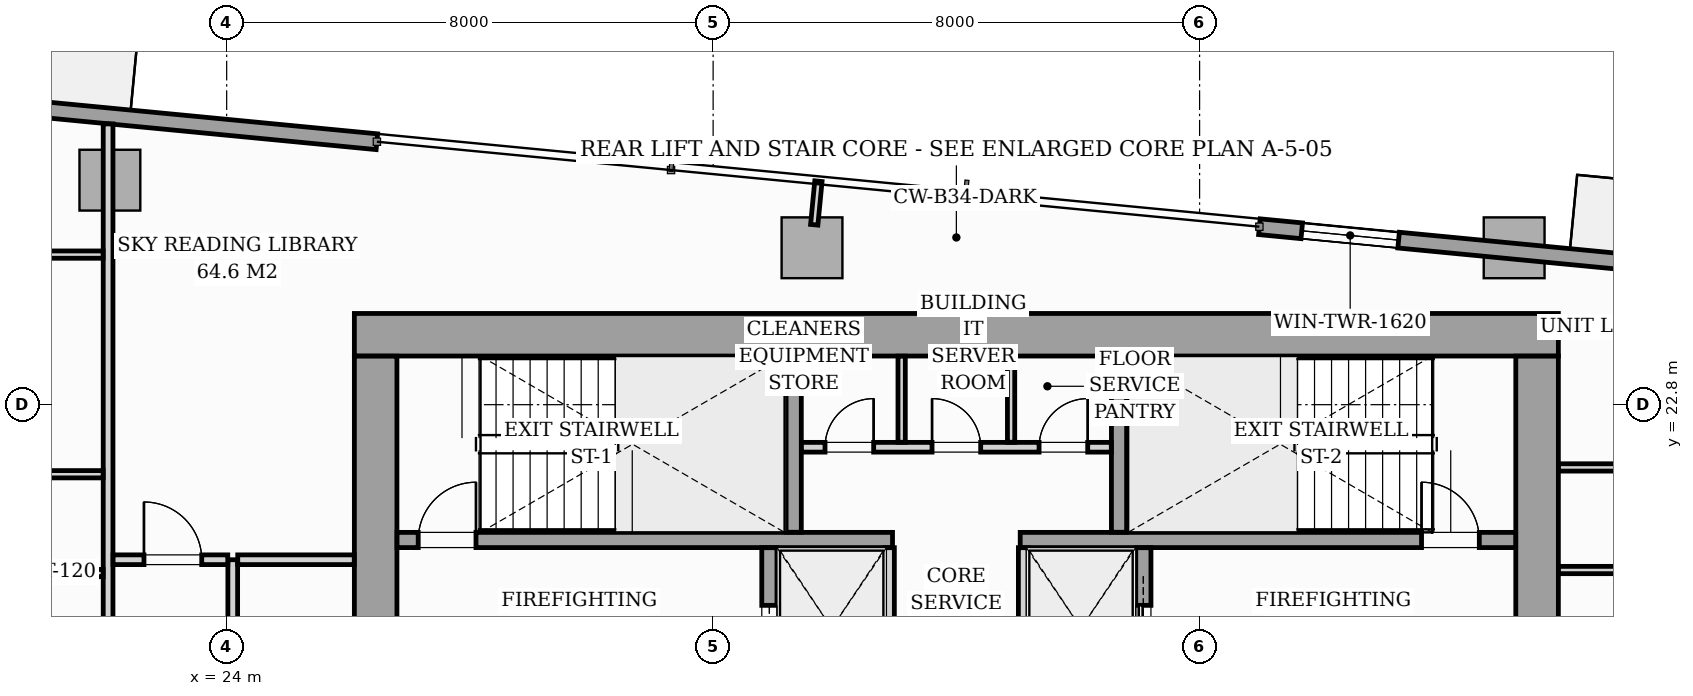
"""IFC4 building model, lengths in metres.
Left out: names, types, materials, properties, quantities, classifications, styles, units other than length and angle.
Written with IfcOpenShell. Run it as: python <this file> out.ifc"""

import sys

from ifc_helpers import new_model, si_unit, direction, frame, frame_2d, origin, origin_2d, place, context, subcontext, project, spatial, rectangle, i_section, extrude, source, transform, mapped, element, fill, save


model = new_model("IFC4")
c1 = context("Model", 3, precision=1e-05, world=origin(), true_north=direction((0.0, 1.0)))
c2 = subcontext(c1, "Body", "Model", "MODEL_VIEW")
j1 = project(units=[si_unit("LENGTHUNIT", "METRE"), si_unit("PLANEANGLEUNIT", "RADIAN")], contexts=[c1])
p1 = place(None, origin())
s1 = spatial("IfcSite", under=j1, at=p1, CompositionType="ELEMENT")
p2 = place(p1, origin())
s2 = spatial("IfcBuilding", under=s1, at=p2, CompositionType="ELEMENT")
p3 = place(p2, frame((0.0, 0.0, 124.6)))
s3 = spatial("IfcBuildingStorey", under=s2, at=p3, CompositionType="ELEMENT", Elevation=124.6)
m1 = source(origin(), c2, "Body", "SweptSolid", [
    extrude(i_section(OverallWidth=0.421, OverallDepth=0.465, WebThickness=0.045, FlangeThickness=0.073, FilletRadius=0.018, at=origin_2d()), origin(), (0.0, 0.0, 1.0), 3.196),
])
for number, where, z_axis, x_axis in (
    (1, (26.4, 24.0, 0.002), (0.0, 0.0, 1.0), (1.0, 0.0, 0.0)),
    (2, (33.12, 24.0, 0.002), (0.0, 0.0, 1.0), (1.0, 0.0, 0.0)),
    (3, (38.88, 24.0, 0.002), (0.0, 0.0, 1.0), (1.0, 0.0, 0.0)),
    (4, (45.6, 24.0, 0.002), (0.0, 0.0, 1.0), (1.0, 0.0, 0.0)),
):
    element("IfcColumn", number, at=place(p3, frame(where, z_axis=z_axis, x_axis=x_axis)), inside=s3, PredefinedType="PILASTER", context=c2, shape_type="MappedRepresentation", body=[
        mapped(m1, transform((0.0, 0.0, 0.0), scale=1.0)),
    ])
m2 = source(origin(), c2, "Body", "SweptSolid", [
    extrude(rectangle(XDim=1.0, YDim=1.0, at=origin_2d()), origin(), (0.0, 0.0, 1.0), 3.194),
])
for number, where, z_axis, x_axis in (
    (5, (22.08, 26.492, 0.004), (0.0, 0.0, 1.0), (0.995, -0.096, 0.0)),
    (6, (33.626, 25.38, 0.004), (0.0, 0.0, 1.0), (0.995, -0.096, 0.0)),
    (7, (45.173, 25.38, 0.004), (0.0, 0.0, 1.0), (0.995, -0.096, 0.0)),
):
    element("IfcColumn", number, at=place(p3, frame(where, z_axis=z_axis, x_axis=x_axis)), inside=s3, PredefinedType="COLUMN", context=c2, shape_type="MappedRepresentation", body=[
        mapped(m2, transform((0.0, 0.0, 0.0), scale=1.0)),
    ])
p4 = place(p3, frame((9.539, 28.754, 0.0), z_axis=(0.0, 0.0, 1.0), x_axis=(0.995397345886, -0.09583383433, 0.0)))
e8 = element("IfcWall", 8, at=p4, inside=s3, PredefinedType="STANDARD", context=c2, shape_type="SweptSolid", body=[
    extrude(rectangle(XDim=17.01, YDim=0.26, at=frame_2d((8.505, 0.0))), origin(), (0.0, 0.0, 1.0), 2.94),
])
p5 = place(p4, frame((6.711, 0.0, 0.0)))
e9 = element("IfcOpeningElement", 9, at=p5, cuts=e8, PredefinedType="OPENING", context=c2, shape_type="SweptSolid", body=[
    extrude(rectangle(XDim=1.8, YDim=2.06, at=frame_2d((0.9, 1.03))), frame((0.0, 0.14, 0.0), z_axis=(0.0, -1.0, 0.0), x_axis=(1.0, 0.0, 0.0)), (0.0, 0.0, 1.0), 0.28),
])
p6 = place(p4, frame((2.5, 0.0, 0.65)))
e10 = element("IfcOpeningElement", 10, at=p6, cuts=e8, PredefinedType="OPENING", context=c2, shape_type="SweptSolid", body=[
    extrude(rectangle(XDim=1.6, YDim=1.5, at=frame_2d((0.8, 0.75))), frame((0.0, 0.14, 0.0), z_axis=(0.0, -1.0, 0.0), x_axis=(1.0, 0.0, 0.0)), (0.0, 0.0, 1.0), 0.28),
])
p7 = place(p3, frame((40.983, 25.727, 0.0), z_axis=(0.0, 0.0, 1.0), x_axis=(0.995395844771, -0.095849424686, 0.0)))
e11 = element("IfcWall", 11, at=p7, inside=s3, PredefinedType="STANDARD", context=c2, shape_type="SweptSolid", body=[
    extrude(rectangle(XDim=17.01, YDim=0.26, at=frame_2d((8.505, 0.0))), origin(), (0.0, 0.0, 1.0), 2.94),
])
p8 = place(p7, frame((11.06, 0.0, 0.0)))
e12 = element("IfcOpeningElement", 12, at=p8, cuts=e11, PredefinedType="OPENING", context=c2, shape_type="SweptSolid", body=[
    extrude(rectangle(XDim=1.8, YDim=2.06, at=frame_2d((0.9, 1.03))), frame((0.0, 0.14, 0.0), z_axis=(0.0, -1.0, 0.0), x_axis=(1.0, 0.0, 0.0)), (0.0, 0.0, 1.0), 0.28),
])
p9 = place(p7, frame((0.7, 0.0, 0.65)))
e13 = element("IfcOpeningElement", 13, at=p9, cuts=e11, PredefinedType="OPENING", context=c2, shape_type="SweptSolid", body=[
    extrude(rectangle(XDim=1.6, YDim=1.5, at=frame_2d((0.8, 0.75))), frame((0.0, 0.14, 0.0), z_axis=(0.0, -1.0, 0.0), x_axis=(1.0, 0.0, 0.0)), (0.0, 0.0, 1.0), 0.28),
])
p10 = place(p3, frame((26.1, 23.95, 0.0), z_axis=(0.0, 0.0, 1.0), x_axis=(1.0, 0.0, 0.0)))
e14 = element("IfcWall", 14, at=p10, inside=s3, PredefinedType="SHEAR", context=c2, shape_type="SweptSolid", body=[
    extrude(rectangle(XDim=19.8, YDim=0.7, at=frame_2d((9.9, 0.0))), origin(), (0.0, 0.0, 1.0), 3.2),
])
for number, where, z_axis, x_axis in (
    (15, (26.45, 17.802, 0.0), (0.0, 0.0, 1.0), (0.0, 1.0, 0.0)),
    (16, (45.55, 17.802, 0.0), (0.0, 0.0, 1.0), (0.0, 1.0, 0.0)),
):
    element("IfcWall", number, at=place(p3, frame(where, z_axis=z_axis, x_axis=x_axis)), inside=s3, PredefinedType="SHEAR", context=c2, shape_type="SweptSolid", body=[
        extrude(rectangle(XDim=5.796, YDim=0.7, at=frame_2d((2.898, 0.0))), origin(), (0.0, 0.0, 1.0), 3.2),
    ])
p11 = place(p3, frame((26.802, 20.575, 0.0), z_axis=(0.0, 0.0, 1.0), x_axis=(1.0, 0.0, 0.0)))
e17 = element("IfcWall", 17, at=p11, inside=s3, PredefinedType="SOLIDWALL", context=c2, shape_type="SweptSolid", body=[
    extrude(rectangle(XDim=8.148, YDim=0.25, at=frame_2d((4.074, 0.0))), origin(), (0.0, 0.0, 1.0), 3.2),
])
p12 = place(p11, frame((0.348, 0.0, 0.0)))
e18 = element("IfcOpeningElement", 18, at=p12, cuts=e17, PredefinedType="OPENING", context=c2, shape_type="SweptSolid", body=[
    extrude(rectangle(XDim=0.95, YDim=2.06, at=frame_2d((0.475, 1.03))), frame((0.0, 0.135, 0.0), z_axis=(0.0, -1.0, 0.0), x_axis=(1.0, 0.0, 0.0)), (0.0, 0.0, 1.0), 0.27),
])
p13 = place(p3, frame((37.05, 20.575, 0.0), z_axis=(0.0, 0.0, 1.0), x_axis=(1.0, 0.0, 0.0)))
e19 = element("IfcWall", 19, at=p13, inside=s3, PredefinedType="SOLIDWALL", context=c2, shape_type="SweptSolid", body=[
    extrude(rectangle(XDim=8.148, YDim=0.25, at=frame_2d((4.074, 0.0))), origin(), (0.0, 0.0, 1.0), 3.2),
])
p14 = place(p13, frame((6.6, 0.0, 0.0)))
e20 = element("IfcOpeningElement", 20, at=p14, cuts=e19, PredefinedType="OPENING", context=c2, shape_type="SweptSolid", body=[
    extrude(rectangle(XDim=0.95, YDim=2.06, at=frame_2d((0.475, 1.03))), frame((0.0, 0.135, 0.0), z_axis=(0.0, -1.0, 0.0), x_axis=(1.0, 0.0, 0.0)), (0.0, 0.0, 1.0), 0.27),
])
for number, where, z_axis, x_axis in (
    (21, (33.325, 20.702, 0.0), (0.0, 0.0, 1.0), (0.0, 1.0, 0.0)),
    (22, (38.675, 20.702, 0.0), (0.0, 0.0, 1.0), (0.0, 1.0, 0.0)),
):
    element("IfcWall", number, at=place(p3, frame(where, z_axis=z_axis, x_axis=x_axis)), inside=s3, PredefinedType="SOLIDWALL", context=c2, shape_type="SweptSolid", body=[
        extrude(rectangle(XDim=2.896, YDim=0.25, at=frame_2d((1.448, 0.0))), origin(), (0.0, 0.0, 1.0), 3.2),
    ])
p15 = place(p3, frame((32.925, 17.802, 0.0), z_axis=(0.0, 0.0, 1.0), x_axis=(0.0, 1.0, 0.0)))
e23 = element("IfcWall", 23, at=p15, inside=s3, PredefinedType="SOLIDWALL", context=c2, shape_type="SweptSolid", body=[
    extrude(rectangle(XDim=2.646, YDim=0.25, at=frame_2d((1.323, 0.0))), origin(), (0.0, 0.0, 1.0), 3.2),
])
p16 = place(p15, frame((0.598, 0.0, 0.0)))
e24 = element("IfcOpeningElement", 24, at=p16, cuts=e23, PredefinedType="OPENING", context=c2, shape_type="SweptSolid", body=[
    extrude(rectangle(XDim=1.1, YDim=2.08, at=frame_2d((0.55, 1.04))), frame((0.0, 0.135, 0.0), z_axis=(0.0, -1.0, 0.0), x_axis=(1.0, 0.0, 0.0)), (0.0, 0.0, 1.0), 0.27),
])
for number, where, z_axis, x_axis in (
    (25, (34.9, 17.802, 0.0), (0.0, 0.0, 1.0), (0.0, 1.0, 0.0)),
    (26, (37.1, 17.802, 0.0), (0.0, 0.0, 1.0), (0.0, 1.0, 0.0)),
):
    element("IfcWall", number, at=place(p3, frame(where, z_axis=z_axis, x_axis=x_axis)), inside=s3, PredefinedType="PARTITIONING", context=c2, shape_type="SweptSolid", body=[
        extrude(rectangle(XDim=2.646, YDim=0.16, at=frame_2d((1.323, 0.0))), origin(), (0.0, 0.0, 1.0), 2.94),
    ])
p17 = place(p3, frame((39.075, 17.802, 0.0), z_axis=(0.0, 0.0, 1.0), x_axis=(0.0, 1.0, 0.0)))
e27 = element("IfcWall", 27, at=p17, inside=s3, PredefinedType="SOLIDWALL", context=c2, shape_type="SweptSolid", body=[
    extrude(rectangle(XDim=2.646, YDim=0.25, at=frame_2d((1.323, 0.0))), origin(), (0.0, 0.0, 1.0), 3.2),
])
p18 = place(p17, frame((0.598, 0.0, 0.0)))
e28 = element("IfcOpeningElement", 28, at=p18, cuts=e27, PredefinedType="OPENING", context=c2, shape_type="SweptSolid", body=[
    extrude(rectangle(XDim=1.1, YDim=2.08, at=frame_2d((0.55, 1.04))), frame((0.0, 0.135, 0.0), z_axis=(0.0, -1.0, 0.0), x_axis=(1.0, 0.0, 0.0)), (0.0, 0.0, 1.0), 0.27),
])
p19 = place(p3, frame((33.452, 22.1, 0.0), z_axis=(0.0, 0.0, 1.0), x_axis=(1.0, 0.0, 0.0)))
e29 = element("IfcWall", 29, at=p19, inside=s3, PredefinedType="PARTITIONING", context=c2, shape_type="SweptSolid", body=[
    extrude(rectangle(XDim=5.096, YDim=0.16, at=frame_2d((2.548, 0.0))), origin(), (0.0, 0.0, 1.0), 2.94),
])
p20 = place(p19, frame((0.388, 0.0, 0.0)))
e30 = element("IfcOpeningElement", 30, at=p20, cuts=e29, PredefinedType="OPENING", context=c2, shape_type="SweptSolid", body=[
    extrude(rectangle(XDim=0.8, YDim=2.05, at=frame_2d((0.4, 1.025))), frame((0.0, 0.09, 0.0), z_axis=(0.0, -1.0, 0.0), x_axis=(1.0, 0.0, 0.0)), (0.0, 0.0, 1.0), 0.18),
])
p21 = place(p19, frame((2.148, 0.0, 0.0)))
e31 = element("IfcOpeningElement", 31, at=p21, cuts=e29, PredefinedType="OPENING", context=c2, shape_type="SweptSolid", body=[
    extrude(rectangle(XDim=0.8, YDim=2.05, at=frame_2d((0.4, 1.025))), frame((0.0, 0.09, 0.0), z_axis=(0.0, -1.0, 0.0), x_axis=(1.0, 0.0, 0.0)), (0.0, 0.0, 1.0), 0.18),
])
p22 = place(p19, frame((3.908, 0.0, 0.0)))
e32 = element("IfcOpeningElement", 32, at=p22, cuts=e29, PredefinedType="OPENING", context=c2, shape_type="SweptSolid", body=[
    extrude(rectangle(XDim=0.8, YDim=2.05, at=frame_2d((0.4, 1.025))), frame((0.0, 0.09, 0.0), z_axis=(0.0, -1.0, 0.0), x_axis=(1.0, 0.0, 0.0)), (0.0, 0.0, 1.0), 0.18),
])
for number, where, z_axis, x_axis in (
    (33, (35.1, 22.182, 0.0), (0.0, 0.0, 1.0), (0.0, 1.0, 0.0)),
    (34, (36.9, 22.182, 0.0), (0.0, 0.0, 1.0), (0.0, 1.0, 0.0)),
):
    element("IfcWall", number, at=place(p3, frame(where, z_axis=z_axis, x_axis=x_axis)), inside=s3, PredefinedType="PARTITIONING", context=c2, shape_type="SweptSolid", body=[
        extrude(rectangle(XDim=1.416, YDim=0.12, at=frame_2d((0.708, 0.0))), origin(), (0.0, 0.0, 1.0), 2.94),
    ])
p23 = place(p3, frame((22.05, 12.632, 0.0), z_axis=(0.0, 0.0, 1.0), x_axis=(0.0, 1.0, 0.0)))
e35 = element("IfcWall", 35, at=p23, inside=s3, PredefinedType="PARTITIONING", context=c2, shape_type="SweptSolid", body=[
    extrude(rectangle(XDim=14.785, YDim=0.16, at=frame_2d((7.393, 0.0))), origin(), (0.0, 0.0, 1.0), 2.94),
])
p24 = place(p23, frame((0.493, 0.0, 0.0)))
e36 = element("IfcOpeningElement", 36, at=p24, cuts=e35, PredefinedType="OPENING", context=c2, shape_type="SweptSolid", body=[
    extrude(rectangle(XDim=0.95, YDim=2.06, at=frame_2d((0.475, 1.03))), frame((0.0, 0.09, 0.0), z_axis=(0.0, -1.0, 0.0), x_axis=(1.0, 0.0, 0.0)), (0.0, 0.0, 1.0), 0.18),
])
p25 = place(p3, frame((14.426, 25.268, 0.0), z_axis=(0.0, 0.0, 1.0), x_axis=(1.0, 0.0, 0.0)))
e37 = element("IfcWall", 37, at=p25, inside=s3, PredefinedType="PARTITIONING", context=c2, shape_type="SweptSolid", body=[
    extrude(rectangle(XDim=7.542, YDim=0.12, at=frame_2d((3.771, 0.0))), origin(), (0.0, 0.0, 1.0), 2.94),
])
p26 = place(p25, frame((3.316, 0.0, 0.0)))
e38 = element("IfcOpeningElement", 38, at=p26, cuts=e37, PredefinedType="OPENING", context=c2, shape_type="SweptSolid", body=[
    extrude(rectangle(XDim=0.85, YDim=2.05, at=frame_2d((0.425, 1.025))), frame((0.0, 0.07, 0.0), z_axis=(0.0, -1.0, 0.0), x_axis=(1.0, 0.0, 0.0)), (0.0, 0.0, 1.0), 0.14),
])
p27 = place(p3, frame((6.424, 21.656, 0.0), z_axis=(0.0, 0.0, 1.0), x_axis=(1.0, 0.0, 0.0)))
e39 = element("IfcWall", 39, at=p27, inside=s3, PredefinedType="PARTITIONING", context=c2, shape_type="SweptSolid", body=[
    extrude(rectangle(XDim=15.544, YDim=0.12, at=frame_2d((7.772, 0.0))), origin(), (0.0, 0.0, 1.0), 2.94),
])
p28 = place(p27, frame((9.422, 0.0, 0.0)))
e40 = element("IfcOpeningElement", 40, at=p28, cuts=e39, PredefinedType="OPENING", context=c2, shape_type="SweptSolid", body=[
    extrude(rectangle(XDim=0.85, YDim=2.05, at=frame_2d((0.425, 1.025))), frame((0.0, 0.07, 0.0), z_axis=(0.0, -1.0, 0.0), x_axis=(1.0, 0.0, 0.0)), (0.0, 0.0, 1.0), 0.14),
])
p29 = place(p3, frame((6.268, 20.031, 0.0), z_axis=(0.0, 0.0, 1.0), x_axis=(1.0, 0.0, 0.0)))
e41 = element("IfcWall", 41, at=p29, inside=s3, PredefinedType="PARTITIONING", context=c2, shape_type="SweptSolid", body=[
    extrude(rectangle(XDim=15.7, YDim=0.12, at=frame_2d((7.85, 0.0))), origin(), (0.0, 0.0, 1.0), 2.94),
])
p30 = place(p29, frame((9.579, 0.0, 0.0)))
e42 = element("IfcOpeningElement", 42, at=p30, cuts=e41, PredefinedType="OPENING", context=c2, shape_type="SweptSolid", body=[
    extrude(rectangle(XDim=0.85, YDim=2.05, at=frame_2d((0.425, 1.025))), frame((0.0, 0.07, 0.0), z_axis=(0.0, -1.0, 0.0), x_axis=(1.0, 0.0, 0.0)), (0.0, 0.0, 1.0), 0.14),
])
p31 = place(p3, frame((45.902, 21.768, 0.0), z_axis=(0.0, 0.0, 1.0), x_axis=(1.0, 0.0, 0.0)))
e43 = element("IfcWall", 43, at=p31, inside=s3, PredefinedType="PARTITIONING", context=c2, shape_type="SweptSolid", body=[
    extrude(rectangle(XDim=12.781, YDim=0.12, at=frame_2d((6.391, 0.0))), origin(), (0.0, 0.0, 1.0), 2.94),
])
p32 = place(p31, frame((6.146, 0.0, 0.0)))
e44 = element("IfcOpeningElement", 44, at=p32, cuts=e43, PredefinedType="OPENING", context=c2, shape_type="SweptSolid", body=[
    extrude(rectangle(XDim=0.85, YDim=2.05, at=frame_2d((0.425, 1.025))), frame((0.0, 0.07, 0.0), z_axis=(0.0, -1.0, 0.0), x_axis=(1.0, 0.0, 0.0)), (0.0, 0.0, 1.0), 0.14),
])
p33 = place(p3, frame((45.902, 20.081, 0.0), z_axis=(0.0, 0.0, 1.0), x_axis=(1.0, 0.0, 0.0)))
e45 = element("IfcWall", 45, at=p33, inside=s3, PredefinedType="PARTITIONING", context=c2, shape_type="SweptSolid", body=[
    extrude(rectangle(XDim=14.057, YDim=0.12, at=frame_2d((7.029, 0.0))), origin(), (0.0, 0.0, 1.0), 2.94),
])
p34 = place(p33, frame((6.708, 0.0, 0.0)))
e46 = element("IfcOpeningElement", 46, at=p34, cuts=e45, PredefinedType="OPENING", context=c2, shape_type="SweptSolid", body=[
    extrude(rectangle(XDim=0.85, YDim=2.05, at=frame_2d((0.425, 1.025))), frame((0.0, 0.07, 0.0), z_axis=(0.0, -1.0, 0.0), x_axis=(1.0, 0.0, 0.0)), (0.0, 0.0, 1.0), 0.14),
])
p35 = place(p3, frame((24.1, 14.66, 0.0), z_axis=(0.0, 0.0, 1.0), x_axis=(0.0, 1.0, 0.0)))
e47 = element("IfcWall", 47, at=p35, inside=s3, PredefinedType="PARTITIONING", context=c2, shape_type="SweptSolid", body=[
    extrude(rectangle(XDim=5.59, YDim=0.16, at=frame_2d((2.795, 0.0))), origin(), (0.0, 0.0, 1.0), 2.94),
])
p36 = place(p35, frame((2.36, 0.0, 0.0)))
e48 = element("IfcOpeningElement", 48, at=p36, cuts=e47, PredefinedType="OPENING", context=c2, shape_type="SweptSolid", body=[
    extrude(rectangle(XDim=0.85, YDim=2.0, at=frame_2d((0.425, 1.0))), frame((0.0, 0.09, 0.0), z_axis=(0.0, -1.0, 0.0), x_axis=(1.0, 0.0, 0.0)), (0.0, 0.0, 1.0), 0.18),
])
p37 = place(p3, frame((22.132, 20.25, 0.0), z_axis=(0.0, 0.0, 1.0), x_axis=(1.0, 0.0, 0.0)))
e49 = element("IfcWall", 49, at=p37, inside=s3, PredefinedType="PARTITIONING", context=c2, shape_type="SweptSolid", body=[
    extrude(rectangle(XDim=1.886, YDim=0.16, at=frame_2d((0.943, 0.0))), origin(), (0.0, 0.0, 1.0), 2.94),
])
p38 = place(p37, frame((0.508, 0.0, 0.0)))
e50 = element("IfcOpeningElement", 50, at=p38, cuts=e49, PredefinedType="OPENING", context=c2, shape_type="SweptSolid", body=[
    extrude(rectangle(XDim=0.95, YDim=2.06, at=frame_2d((0.475, 1.03))), frame((0.0, 0.09, 0.0), z_axis=(0.0, -1.0, 0.0), x_axis=(1.0, 0.0, 0.0)), (0.0, 0.0, 1.0), 0.18),
])
p39 = place(p3, frame((24.182, 20.25, 0.0), z_axis=(0.0, 0.0, 1.0), x_axis=(1.0, 0.0, 0.0)))
e51 = element("IfcWall", 51, at=p39, inside=s3, PredefinedType="PARTITIONING", context=c2, shape_type="SweptSolid", body=[
    extrude(rectangle(XDim=1.916, YDim=0.16, at=frame_2d((0.958, 0.0))), origin(), (0.0, 0.0, 1.0), 2.94),
])
p40 = place(p3, frame((33.663, 25.759, 0.0), z_axis=(0.0, 0.0, 1.0), x_axis=(0.095977354523, 0.995383517755, 0.0)))
e52 = element("IfcWall", 52, at=p40, inside=s3, PredefinedType="PARTITIONING", context=c2, shape_type="SweptSolid", body=[
    extrude(rectangle(XDim=0.72, YDim=0.12, at=frame_2d((0.36, 0.0))), origin(), (0.0, 0.0, 1.0), 2.94),
])
m3 = source(origin(), c2, "Body", "SweptSolid", [
    extrude(rectangle(XDim=1.6, YDim=1.5, at=frame_2d((0.8, 0.75))), frame((0.0, 0.03, 0.0), z_axis=(0.0, -1.0, 0.0), x_axis=(1.0, 0.0, 0.0)), (0.0, 0.0, 1.0), 0.06),
])
p41 = place(p9, origin())
e53 = element("IfcWindow", 53, at=p41, inside=s3, PartitioningType="SINGLE_PANEL", PredefinedType="WINDOW", context=c2, shape_type="MappedRepresentation", body=[
    mapped(m3, transform((0.0, 0.0, 0.0), scale=1.0)),
])
fill(e13, e53)
m4 = source(origin(), c2, "Body", "SweptSolid", [
    extrude(rectangle(XDim=0.95, YDim=2.06, at=frame_2d((0.475, 1.03))), frame((0.0, 0.025, 0.0), z_axis=(0.0, -1.0, 0.0), x_axis=(1.0, 0.0, 0.0)), (0.0, 0.0, 1.0), 0.05),
])
p42 = place(p12, origin())
e54 = element("IfcDoor", 54, at=p42, inside=s3, OperationType="SINGLE_SWING_RIGHT", PredefinedType="DOOR", context=c2, shape_type="MappedRepresentation", body=[
    mapped(m4, transform((0.0, 0.0, 0.0), scale=1.0)),
])
fill(e18, e54)
p43 = place(p14, origin())
e55 = element("IfcDoor", 55, at=p43, inside=s3, OperationType="SINGLE_SWING_LEFT", PredefinedType="DOOR", context=c2, shape_type="MappedRepresentation", body=[
    mapped(m4, transform((0.0, 0.0, 0.0), scale=1.0)),
])
fill(e20, e55)
m5 = source(origin(), c2, "Body", "SweptSolid", [
    extrude(rectangle(XDim=1.1, YDim=2.08, at=frame_2d((0.55, 1.04))), frame((0.0, 0.025, 0.0), z_axis=(0.0, -1.0, 0.0), x_axis=(1.0, 0.0, 0.0)), (0.0, 0.0, 1.0), 0.05),
])
p44 = place(p16, origin())
e56 = element("IfcDoor", 56, at=p44, inside=s3, OperationType="SLIDING_TO_LEFT", PredefinedType="DOOR", context=c2, shape_type="MappedRepresentation", body=[
    mapped(m5, transform((0.0, 0.0, 0.0), scale=1.0)),
])
fill(e24, e56)
p45 = place(p18, origin())
e57 = element("IfcDoor", 57, at=p45, inside=s3, OperationType="SLIDING_TO_RIGHT", PredefinedType="DOOR", context=c2, shape_type="MappedRepresentation", body=[
    mapped(m5, transform((0.0, 0.0, 0.0), scale=1.0)),
])
fill(e28, e57)
m6 = source(origin(), c2, "Body", "SweptSolid", [
    extrude(rectangle(XDim=0.8, YDim=2.05, at=frame_2d((0.4, 1.025))), frame((0.0, 0.025, 0.0), z_axis=(0.0, -1.0, 0.0), x_axis=(1.0, 0.0, 0.0)), (0.0, 0.0, 1.0), 0.05),
])
p46 = place(p20, origin())
e58 = element("IfcDoor", 58, at=p46, inside=s3, OperationType="SINGLE_SWING_RIGHT", PredefinedType="DOOR", context=c2, shape_type="MappedRepresentation", body=[
    mapped(m6, transform((0.0, 0.0, 0.0), scale=1.0)),
])
fill(e30, e58)
p47 = place(p21, origin())
e59 = element("IfcDoor", 59, at=p47, inside=s3, OperationType="SINGLE_SWING_LEFT", PredefinedType="DOOR", context=c2, shape_type="MappedRepresentation", body=[
    mapped(m6, transform((0.0, 0.0, 0.0), scale=1.0)),
])
fill(e31, e59)
p48 = place(p22, origin())
e60 = element("IfcDoor", 60, at=p48, inside=s3, OperationType="SINGLE_SWING_RIGHT", PredefinedType="DOOR", context=c2, shape_type="MappedRepresentation", body=[
    mapped(m6, transform((0.0, 0.0, 0.0), scale=1.0)),
])
fill(e32, e60)
m7 = source(origin(), c2, "Body", "SweptSolid", [
    extrude(rectangle(XDim=0.95, YDim=2.06, at=frame_2d((0.475, 1.03))), frame((0.0, 0.025, 0.0), z_axis=(0.0, -1.0, 0.0), x_axis=(1.0, 0.0, 0.0)), (0.0, 0.0, 1.0), 0.05),
])
p49 = place(p38, origin())
e61 = element("IfcDoor", 61, at=p49, inside=s3, OperationType="SINGLE_SWING_LEFT", PredefinedType="DOOR", context=c2, shape_type="MappedRepresentation", body=[
    mapped(m7, transform((0.0, 0.0, 0.0), scale=1.0)),
])
fill(e50, e61)
save(model, sys.argv[1])
